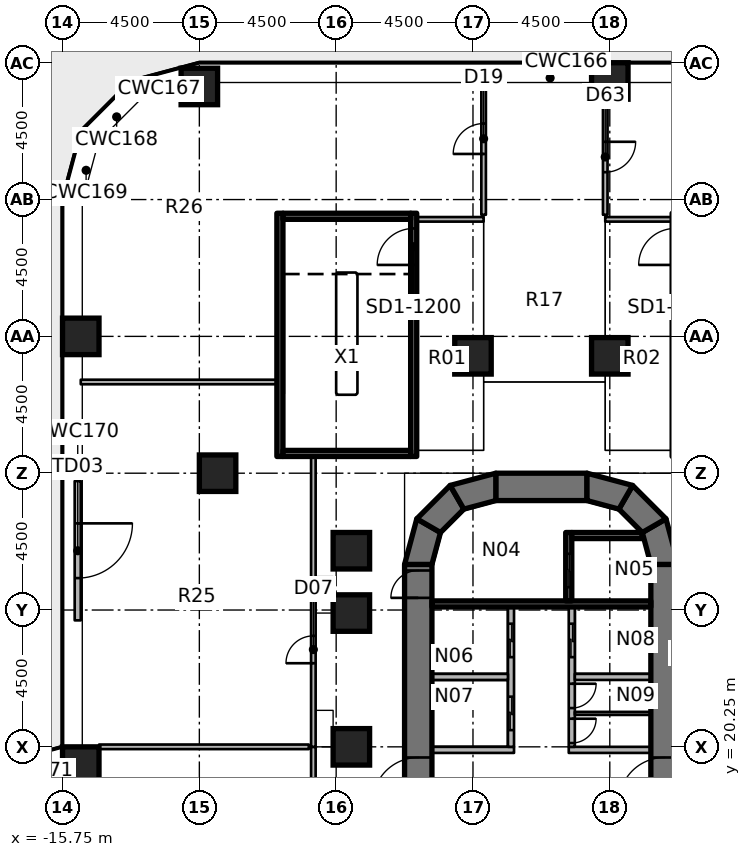
"""IFC4 building model, lengths in metres.
Left out: names, types, materials, properties, quantities, classifications, styles, units other than length and angle.
Written with IfcOpenShell. Run it as: python <this file> out.ifc"""

import sys

from ifc_helpers import new_model, si_unit, direction, frame, frame_2d, origin, origin_2d, place, context, subcontext, project, spatial, polyline, rectangle, outline, extrude, element, fill, save


model = new_model("IFC4")
c1 = context("Model", 3, precision=1e-05, world=origin(), true_north=direction((0.0, 1.0)))
c2 = subcontext(c1, "Body", "Model", "MODEL_VIEW")
j1 = project(units=[si_unit("LENGTHUNIT", "METRE"), si_unit("PLANEANGLEUNIT", "RADIAN")], contexts=[c1])
p1 = place(None, origin())
s1 = spatial("IfcSite", under=j1, at=p1, CompositionType="ELEMENT")
p2 = place(p1, origin())
s2 = spatial("IfcBuilding", under=s1, at=p2, CompositionType="ELEMENT")
p3 = place(p2, frame((0.0, 0.0, 17.0)))
s3 = spatial("IfcBuildingStorey", under=s2, at=p3, CompositionType="ELEMENT", Elevation=17.0)
for number, where, z_axis, x_axis in (
    (1, (-15.15, 19.65, 0.0), (0.0, 0.0, 1.0), (1.0, 0.0, 0.0)),
    (2, (-15.15, 33.75, 0.0), (0.0, 0.0, 1.0), (1.0, 0.0, 0.0)),
    (3, (-10.65, 29.25, 0.0), (0.0, 0.0, 1.0), (1.0, 0.0, 0.0)),
    (4, (-11.25, 41.97, 0.0), (0.0, 0.0, 1.0), (1.0, 0.0, 0.0)),
    (5, (-6.25, 20.25, 0.0), (0.0, 0.0, 1.0), (1.0, 0.0, 0.0)),
    (6, (-6.25, 24.65, 0.0), (0.0, 0.0, 1.0), (1.0, 0.0, 0.0)),
    (7, (-6.25, 26.7, 0.0), (0.0, 0.0, 1.0), (1.0, 0.0, 0.0)),
    (8, (-2.25, 33.11, 0.0), (0.0, 0.0, 1.0), (1.0, 0.0, 0.0)),
    (9, (2.25, 33.11, 0.0), (0.0, 0.0, 1.0), (1.0, 0.0, 0.0)),
    (10, (2.25, 42.15, 0.0), (0.0, 0.0, 1.0), (1.0, 0.0, 0.0)),
):
    element("IfcColumn", number, at=place(p3, frame(where, z_axis=z_axis, x_axis=x_axis)), inside=s3, PredefinedType="COLUMN", context=c2, shape_type="SweptSolid", body=[
        extrude(rectangle(XDim=1.2, YDim=1.2, at=origin_2d()), origin(), (0.0, 0.0, 1.0), 4.55),
    ])
p4 = place(p3, frame((-4.05, 11.25, 0.0), z_axis=(0.0, 0.0, 1.0), x_axis=(0.0, 1.0, 0.0)))
e11 = element("IfcWall", 11, at=p4, inside=s3, PredefinedType="SHEAR", context=c2, shape_type="SweptSolid", body=[
    extrude(rectangle(XDim=15.0, YDim=0.9, at=frame_2d((7.5, 0.0))), origin(), (0.0, 0.0, 1.0), 5.0),
])
p5 = place(p4, frame((7.15, 0.0, 0.0)))
e12 = element("IfcOpeningElement", 12, at=p5, cuts=e11, PredefinedType="OPENING", context=c2, shape_type="SweptSolid", body=[
    extrude(rectangle(XDim=1.5, YDim=2.3, at=frame_2d((0.75, 1.15))), frame((0.0, 0.46, 0.0), z_axis=(0.0, -1.0, 0.0), x_axis=(1.0, 0.0, 0.0)), (0.0, 0.0, 1.0), 0.92),
])
p6 = place(p4, frame((13.9, 0.0, 0.0)))
e13 = element("IfcOpeningElement", 13, at=p6, cuts=e11, PredefinedType="OPENING", context=c2, shape_type="SweptSolid", body=[
    extrude(rectangle(XDim=0.9, YDim=2.1, at=frame_2d((0.45, 1.05))), frame((0.0, 0.46, 0.0), z_axis=(0.0, -1.0, 0.0), x_axis=(1.0, 0.0, 0.0)), (0.0, 0.0, 1.0), 0.92),
])
p7 = place(p4, frame((1.15, 0.0, 0.0)))
e14 = element("IfcOpeningElement", 14, at=p7, cuts=e11, PredefinedType="OPENING", context=c2, shape_type="SweptSolid", body=[
    extrude(rectangle(XDim=1.2, YDim=2.1, at=frame_2d((0.6, 1.05))), frame((0.0, 0.46, 0.0), z_axis=(0.0, -1.0, 0.0), x_axis=(1.0, 0.0, 0.0)), (0.0, 0.0, 1.0), 0.92),
])
p8 = place(p3, frame((4.05, 11.25, 0.0), z_axis=(0.0, 0.0, 1.0), x_axis=(0.0, 1.0, 0.0)))
e15 = element("IfcWall", 15, at=p8, inside=s3, PredefinedType="SHEAR", context=c2, shape_type="SweptSolid", body=[
    extrude(rectangle(XDim=15.0, YDim=0.9, at=frame_2d((7.5, 0.0))), origin(), (0.0, 0.0, 1.0), 5.0),
])
p9 = place(p8, frame((7.15, 0.0, 0.0)))
e16 = element("IfcOpeningElement", 16, at=p9, cuts=e15, PredefinedType="OPENING", context=c2, shape_type="SweptSolid", body=[
    extrude(rectangle(XDim=1.5, YDim=2.3, at=frame_2d((0.75, 1.15))), frame((0.0, 0.46, 0.0), z_axis=(0.0, -1.0, 0.0), x_axis=(1.0, 0.0, 0.0)), (0.0, 0.0, 1.0), 0.92),
])
p10 = place(p8, frame((5.55, 0.0, 0.0)))
e17 = element("IfcOpeningElement", 17, at=p10, cuts=e15, PredefinedType="OPENING", context=c2, shape_type="SweptSolid", body=[
    extrude(rectangle(XDim=1.2, YDim=2.1, at=frame_2d((0.6, 1.05))), frame((0.0, 0.46, 0.0), z_axis=(0.0, -1.0, 0.0), x_axis=(1.0, 0.0, 0.0)), (0.0, 0.0, 1.0), 0.92),
])
p11 = place(p3, frame((-1.5, 28.8, 0.0), z_axis=(0.0, 0.0, 1.0), x_axis=(1.0, 0.0, 0.0)))
e18 = element("IfcWall", 18, at=p11, inside=s3, PredefinedType="SHEAR", context=c2, shape_type="SweptSolid", body=[
    extrude(rectangle(XDim=3.0, YDim=0.9, at=frame_2d((1.5, 0.0))), origin(), (0.0, 0.0, 1.0), 5.0),
])
p12 = place(p3, origin())
e19 = element("IfcWall", 19, at=p12, inside=s3, PredefinedType="SHEAR", context=c2, shape_type="SweptSolid", body=[
    extrude(outline(polyline([(-4.5, 26.25), (-4.098, 27.75), (-3.319, 27.3), (-3.6, 26.25), (-4.5, 26.25)])), origin(), (0.0, 0.0, 1.0), 5.0),
])
p13 = place(p3, origin())
e20 = element("IfcWall", 20, at=p13, inside=s3, PredefinedType="SHEAR", context=c2, shape_type="SweptSolid", body=[
    extrude(outline(polyline([(-4.098, 27.75), (-3.0, 28.848), (-2.55, 28.069), (-3.319, 27.3), (-4.098, 27.75)])), origin(), (0.0, 0.0, 1.0), 5.0),
])
p14 = place(p3, origin())
e21 = element("IfcWall", 21, at=p14, inside=s3, PredefinedType="SHEAR", context=c2, shape_type="SweptSolid", body=[
    extrude(outline(polyline([(-3.0, 28.848), (-1.5, 29.25), (-1.5, 28.35), (-2.55, 28.069), (-3.0, 28.848)])), origin(), (0.0, 0.0, 1.0), 5.0),
])
p15 = place(p3, origin())
e22 = element("IfcWall", 22, at=p15, inside=s3, PredefinedType="SHEAR", context=c2, shape_type="SweptSolid", body=[
    extrude(outline(polyline([(4.5, 26.25), (4.098, 27.75), (3.319, 27.3), (3.6, 26.25), (4.5, 26.25)])), origin(), (0.0, 0.0, 1.0), 5.0),
])
p16 = place(p3, origin())
e23 = element("IfcWall", 23, at=p16, inside=s3, PredefinedType="SHEAR", context=c2, shape_type="SweptSolid", body=[
    extrude(outline(polyline([(4.098, 27.75), (3.0, 28.848), (2.55, 28.069), (3.319, 27.3), (4.098, 27.75)])), origin(), (0.0, 0.0, 1.0), 5.0),
])
p17 = place(p3, origin())
e24 = element("IfcWall", 24, at=p17, inside=s3, PredefinedType="SHEAR", context=c2, shape_type="SweptSolid", body=[
    extrude(outline(polyline([(3.0, 28.848), (1.5, 29.25), (1.5, 28.35), (2.55, 28.069), (3.0, 28.848)])), origin(), (0.0, 0.0, 1.0), 5.0),
])
p18 = place(p3, frame((-15.25, 28.99, 0.0), z_axis=(0.0, 0.0, 1.0), x_axis=(0.0, -1.0, 0.0)))
e25 = element("IfcWall", 25, at=p18, inside=s3, PredefinedType="SOLIDWALL", context=c2, shape_type="SweptSolid", body=[
    extrude(rectangle(XDim=4.58, YDim=0.2, at=frame_2d((2.29, 0.0))), origin(), (0.0, 0.0, 1.0), 4.55),
])
p19 = place(p18, frame((1.39, 0.0, 0.0)))
e26 = element("IfcOpeningElement", 26, at=p19, cuts=e25, PredefinedType="OPENING", context=c2, shape_type="SweptSolid", body=[
    extrude(rectangle(XDim=1.8, YDim=2.4, at=frame_2d((0.9, 1.2))), frame((0.0, 0.11, 0.0), z_axis=(0.0, -1.0, 0.0), x_axis=(1.0, 0.0, 0.0)), (0.0, 0.0, 1.0), 0.22),
])
p20 = place(p3, frame((-3.6, 24.95, 0.0), z_axis=(0.0, 0.0, 1.0), x_axis=(1.0, 0.0, 0.0)))
e27 = element("IfcWall", 27, at=p20, inside=s3, PredefinedType="SHEAR", context=c2, shape_type="SweptSolid", body=[
    extrude(rectangle(XDim=7.2, YDim=0.2, at=frame_2d((3.6, 0.0))), origin(), (0.0, 0.0, 1.0), 4.55),
])
p21 = place(p3, frame((0.9, 27.3, 0.0), z_axis=(0.0, 0.0, 1.0), x_axis=(0.0, -1.0, 0.0)))
e28 = element("IfcWall", 28, at=p21, inside=s3, PredefinedType="SHEAR", context=c2, shape_type="SweptSolid", body=[
    extrude(rectangle(XDim=2.25, YDim=0.2, at=frame_2d((1.125, 0.0))), origin(), (0.0, 0.0, 1.0), 4.55),
])
p22 = place(p21, frame((0.7, 0.0, 0.0)))
e29 = element("IfcOpeningElement", 29, at=p22, cuts=e28, PredefinedType="OPENING", context=c2, shape_type="SweptSolid", body=[
    extrude(rectangle(XDim=1.1, YDim=2.3, at=frame_2d((0.55, 1.15))), frame((0.0, 0.11, 0.0), z_axis=(0.0, -1.0, 0.0), x_axis=(1.0, 0.0, 0.0)), (0.0, 0.0, 1.0), 0.22),
])
p23 = place(p3, origin())
e30 = element("IfcWall", 30, at=p23, inside=s3, PredefinedType="SHEAR", context=c2, shape_type="SweptSolid", body=[
    extrude(outline(polyline([(1.0, 27.1), (3.341, 27.1), (3.291, 27.284), (3.275, 27.3), (1.0, 27.3), (1.0, 27.1)])), origin(), (0.0, 0.0, 1.0), 4.55),
])
p24 = place(p3, frame((-3.6, 20.15, 0.0), z_axis=(0.0, 0.0, 1.0), x_axis=(1.0, 0.0, 0.0)))
e31 = element("IfcWall", 31, at=p24, inside=s3, PredefinedType="PARTITIONING", context=c2, shape_type="SweptSolid", body=[
    extrude(rectangle(XDim=2.7, YDim=0.2, at=frame_2d((1.35, 0.0))), origin(), (0.0, 0.0, 1.0), 4.55),
])
p25 = place(p3, frame((-1.0, 24.85, 0.0), z_axis=(0.0, 0.0, 1.0), x_axis=(0.0, -1.0, 0.0)))
e32 = element("IfcWall", 32, at=p25, inside=s3, PredefinedType="PARTITIONING", context=c2, shape_type="SweptSolid", body=[
    extrude(rectangle(XDim=4.6, YDim=0.2, at=frame_2d((2.3, 0.0))), origin(), (0.0, 0.0, 1.0), 4.55),
])
p26 = place(p25, frame((0.55, 0.0, 0.0)))
e33 = element("IfcOpeningElement", 33, at=p26, cuts=e32, PredefinedType="OPENING", context=c2, shape_type="SweptSolid", body=[
    extrude(rectangle(XDim=1.1, YDim=2.3, at=frame_2d((0.55, 1.15))), frame((0.0, 0.11, 0.0), z_axis=(0.0, -1.0, 0.0), x_axis=(1.0, 0.0, 0.0)), (0.0, 0.0, 1.0), 0.22),
])
p27 = place(p25, frame((2.95, 0.0, 0.0)))
e34 = element("IfcOpeningElement", 34, at=p27, cuts=e32, PredefinedType="OPENING", context=c2, shape_type="SweptSolid", body=[
    extrude(rectangle(XDim=1.1, YDim=2.3, at=frame_2d((0.55, 1.15))), frame((0.0, 0.11, 0.0), z_axis=(0.0, -1.0, 0.0), x_axis=(1.0, 0.0, 0.0)), (0.0, 0.0, 1.0), 0.22),
])
p28 = place(p3, frame((0.9, 20.15, 0.0), z_axis=(0.0, 0.0, 1.0), x_axis=(1.0, 0.0, 0.0)))
e35 = element("IfcWall", 35, at=p28, inside=s3, PredefinedType="PARTITIONING", context=c2, shape_type="SweptSolid", body=[
    extrude(rectangle(XDim=2.7, YDim=0.2, at=frame_2d((1.35, 0.0))), origin(), (0.0, 0.0, 1.0), 4.55),
])
p29 = place(p3, frame((1.0, 24.85, 0.0), z_axis=(0.0, 0.0, 1.0), x_axis=(0.0, -1.0, 0.0)))
e36 = element("IfcWall", 36, at=p29, inside=s3, PredefinedType="PARTITIONING", context=c2, shape_type="SweptSolid", body=[
    extrude(rectangle(XDim=4.6, YDim=0.2, at=frame_2d((2.3, 0.0))), origin(), (0.0, 0.0, 1.0), 4.55),
])
p30 = place(p29, frame((0.55, 0.0, 0.0)))
e37 = element("IfcOpeningElement", 37, at=p30, cuts=e36, PredefinedType="OPENING", context=c2, shape_type="SweptSolid", body=[
    extrude(rectangle(XDim=1.1, YDim=2.3, at=frame_2d((0.55, 1.15))), frame((0.0, 0.11, 0.0), z_axis=(0.0, -1.0, 0.0), x_axis=(1.0, 0.0, 0.0)), (0.0, 0.0, 1.0), 0.22),
])
p31 = place(p29, frame((2.525, 0.0, 0.0)))
e38 = element("IfcOpeningElement", 38, at=p31, cuts=e36, PredefinedType="OPENING", context=c2, shape_type="SweptSolid", body=[
    extrude(rectangle(XDim=0.8, YDim=2.1, at=frame_2d((0.4, 1.05))), frame((0.0, 0.11, 0.0), z_axis=(0.0, -1.0, 0.0), x_axis=(1.0, 0.0, 0.0)), (0.0, 0.0, 1.0), 0.22),
])
p32 = place(p29, frame((3.675, 0.0, 0.0)))
e39 = element("IfcOpeningElement", 39, at=p32, cuts=e36, PredefinedType="OPENING", context=c2, shape_type="SweptSolid", body=[
    extrude(rectangle(XDim=0.8, YDim=2.1, at=frame_2d((0.4, 1.05))), frame((0.0, 0.11, 0.0), z_axis=(0.0, -1.0, 0.0), x_axis=(1.0, 0.0, 0.0)), (0.0, 0.0, 1.0), 0.22),
])
for number, where, z_axis, x_axis in (
    (40, (-3.6, 22.55, 0.0), (0.0, 0.0, 1.0), (1.0, 0.0, 0.0)),
    (41, (1.1, 22.55, 0.0), (0.0, 0.0, 1.0), (1.0, 0.0, 0.0)),
):
    element("IfcWall", number, at=place(p3, frame(where, z_axis=z_axis, x_axis=x_axis)), inside=s3, PredefinedType="PARTITIONING", context=c2, shape_type="SweptSolid", body=[
        extrude(rectangle(XDim=2.5, YDim=0.2, at=frame_2d((1.25, 0.0))), origin(), (0.0, 0.0, 1.0), 4.55),
    ])
p33 = place(p3, frame((1.1, 21.35, 0.0), z_axis=(0.0, 0.0, 1.0), x_axis=(1.0, 0.0, 0.0)))
e42 = element("IfcWall", 42, at=p33, inside=s3, PredefinedType="PARTITIONING", context=c2, shape_type="SweptSolid", body=[
    extrude(rectangle(XDim=2.5, YDim=0.1, at=frame_2d((1.25, 0.0))), origin(), (0.0, 0.0, 1.0), 4.55),
])
p34 = place(p3, frame((-8.6, 29.8, 0.0), z_axis=(0.0, 0.0, 1.0), x_axis=(0.0, 1.0, 0.0)))
e43 = element("IfcWall", 43, at=p34, inside=s3, PredefinedType="SHEAR", context=c2, shape_type="SweptSolid", body=[
    extrude(rectangle(XDim=8.0, YDim=0.2, at=frame_2d((4.0, 0.0))), origin(), (0.0, 0.0, 1.0), 4.55),
])
p35 = place(p3, frame((-4.2, 29.8, 0.0), z_axis=(0.0, 0.0, 1.0), x_axis=(0.0, 1.0, 0.0)))
e44 = element("IfcWall", 44, at=p35, inside=s3, PredefinedType="SHEAR", context=c2, shape_type="SweptSolid", body=[
    extrude(rectangle(XDim=8.0, YDim=0.2, at=frame_2d((4.0, 0.0))), origin(), (0.0, 0.0, 1.0), 4.55),
])
p36 = place(p35, frame((6.3, 0.0, 0.0)))
e45 = element("IfcOpeningElement", 45, at=p36, cuts=e44, PredefinedType="OPENING", context=c2, shape_type="SweptSolid", body=[
    extrude(rectangle(XDim=1.2, YDim=2.1, at=frame_2d((0.6, 1.05))), frame((0.0, 0.11, 0.0), z_axis=(0.0, -1.0, 0.0), x_axis=(1.0, 0.0, 0.0)), (0.0, 0.0, 1.0), 0.22),
])
for number, where, z_axis, x_axis in (
    (46, (-8.5, 29.9, 0.0), (0.0, 0.0, 1.0), (1.0, 0.0, 0.0)),
    (47, (-8.5, 37.7, 0.0), (0.0, 0.0, 1.0), (1.0, 0.0, 0.0)),
):
    element("IfcWall", number, at=place(p3, frame(where, z_axis=z_axis, x_axis=x_axis)), inside=s3, PredefinedType="SHEAR", context=c2, shape_type="SweptSolid", body=[
        extrude(rectangle(XDim=4.2, YDim=0.2, at=frame_2d((2.1, 0.0))), origin(), (0.0, 0.0, 1.0), 4.55),
    ])
p37 = place(p3, frame((-4.1, 37.6, 0.0), z_axis=(0.0, 0.0, 1.0), x_axis=(1.0, 0.0, 0.0)))
e48 = element("IfcWall", 48, at=p37, inside=s3, PredefinedType="PARTITIONING", context=c2, shape_type="SweptSolid", body=[
    extrude(rectangle(XDim=2.2, YDim=0.15, at=frame_2d((1.1, 0.0))), origin(), (0.0, 0.0, 1.0), 4.55),
])
p38 = place(p3, frame((2.1, 37.6, 0.0), z_axis=(0.0, 0.0, 1.0), x_axis=(1.0, 0.0, 0.0)))
e49 = element("IfcWall", 49, at=p38, inside=s3, PredefinedType="PARTITIONING", context=c2, shape_type="SweptSolid", body=[
    extrude(rectangle(XDim=2.2, YDim=0.15, at=frame_2d((1.1, 0.0))), origin(), (0.0, 0.0, 1.0), 4.55),
])
p39 = place(p3, frame((-7.5, 8.25, 0.0), z_axis=(0.0, 0.0, 1.0), x_axis=(0.0, 1.0, 0.0)))
e50 = element("IfcWall", 50, at=p39, inside=s3, PredefinedType="PARTITIONING", context=c2, shape_type="SweptSolid", body=[
    extrude(rectangle(XDim=12.0, YDim=0.15, at=frame_2d((6.0, 0.0))), origin(), (0.0, 0.0, 1.0), 4.55),
])
p40 = place(p39, frame((3.5, 0.0, 0.0)))
e51 = element("IfcOpeningElement", 51, at=p40, cuts=e50, PredefinedType="OPENING", context=c2, shape_type="SweptSolid", body=[
    extrude(rectangle(XDim=1.0, YDim=2.1, at=frame_2d((0.5, 1.05))), frame((0.0, 0.085, 0.0), z_axis=(0.0, -1.0, 0.0), x_axis=(1.0, 0.0, 0.0)), (0.0, 0.0, 1.0), 0.17),
])
p41 = place(p3, frame((-7.5, 20.25, 0.0), z_axis=(0.0, 0.0, 1.0), x_axis=(0.0, 1.0, 0.0)))
e52 = element("IfcWall", 52, at=p41, inside=s3, PredefinedType="PARTITIONING", context=c2, shape_type="SweptSolid", body=[
    extrude(rectangle(XDim=9.75, YDim=0.15, at=frame_2d((4.875, 0.0))), origin(), (0.0, 0.0, 1.0), 4.55),
])
p42 = place(p41, frame((2.75, 0.0, 0.0)))
e53 = element("IfcOpeningElement", 53, at=p42, cuts=e52, PredefinedType="OPENING", context=c2, shape_type="SweptSolid", body=[
    extrude(rectangle(XDim=0.9, YDim=2.1, at=frame_2d((0.45, 1.05))), frame((0.0, 0.085, 0.0), z_axis=(0.0, -1.0, 0.0), x_axis=(1.0, 0.0, 0.0)), (0.0, 0.0, 1.0), 0.17),
])
p43 = place(p3, frame((2.1, 41.55, 0.0), z_axis=(0.0, 0.0, 1.0), x_axis=(0.0, -1.0, 0.0)))
e54 = element("IfcWall", 54, at=p43, inside=s3, PredefinedType="PARTITIONING", context=c2, shape_type="SweptSolid", body=[
    extrude(rectangle(XDim=3.8, YDim=0.15, at=frame_2d((1.9, 0.0))), origin(), (0.0, 0.0, 1.0), 4.55),
])
p44 = place(p43, frame((1.4, 0.0, 0.0)))
e55 = element("IfcOpeningElement", 55, at=p44, cuts=e54, PredefinedType="OPENING", context=c2, shape_type="SweptSolid", body=[
    extrude(rectangle(XDim=1.0, YDim=2.1, at=frame_2d((0.5, 1.05))), frame((0.0, 0.085, 0.0), z_axis=(0.0, -1.0, 0.0), x_axis=(1.0, 0.0, 0.0)), (0.0, 0.0, 1.0), 0.17),
])
p45 = place(p3, frame((-1.9, 37.75, 0.0), z_axis=(0.0, 0.0, 1.0), x_axis=(0.0, 1.0, 0.0)))
e56 = element("IfcWall", 56, at=p45, inside=s3, PredefinedType="PARTITIONING", context=c2, shape_type="SweptSolid", body=[
    extrude(rectangle(XDim=4.4, YDim=0.15, at=frame_2d((2.2, 0.0))), origin(), (0.0, 0.0, 1.0), 4.55),
])
p46 = place(p45, frame((2.0, 0.0, 0.0)))
e57 = element("IfcOpeningElement", 57, at=p46, cuts=e56, PredefinedType="OPENING", context=c2, shape_type="SweptSolid", body=[
    extrude(rectangle(XDim=1.0, YDim=2.1, at=frame_2d((0.5, 1.05))), frame((0.0, 0.085, 0.0), z_axis=(0.0, -1.0, 0.0), x_axis=(1.0, 0.0, 0.0)), (0.0, 0.0, 1.0), 0.17),
])
p47 = place(p3, frame((-14.55, 20.25, 0.0), z_axis=(0.0, 0.0, 1.0), x_axis=(1.0, 0.0, 0.0)))
e58 = element("IfcWall", 58, at=p47, inside=s3, PredefinedType="PARTITIONING", context=c2, shape_type="SweptSolid", body=[
    extrude(rectangle(XDim=6.9, YDim=0.15, at=frame_2d((3.45, 0.0))), origin(), (0.0, 0.0, 1.0), 4.55),
])
p48 = place(p3, frame((-15.15, 32.25, 0.0), z_axis=(0.0, 0.0, 1.0), x_axis=(1.0, 0.0, 0.0)))
e59 = element("IfcWall", 59, at=p48, inside=s3, PredefinedType="PARTITIONING", context=c2, shape_type="SweptSolid", body=[
    extrude(rectangle(XDim=6.45, YDim=0.15, at=frame_2d((3.225, 0.0))), origin(), (0.0, 0.0, 1.0), 4.55),
])
p49 = place(p19, origin())
e60 = element("IfcDoor", 60, at=p49, inside=s3, OperationType="SINGLE_SWING_LEFT", PredefinedType="DOOR", context=c2, shape_type="SweptSolid", body=[
    extrude(rectangle(XDim=1.8, YDim=2.4, at=frame_2d((0.9, 1.2))), frame((0.0, 0.025, 0.0), z_axis=(0.0, -1.0, 0.0), x_axis=(1.0, 0.0, 0.0)), (0.0, 0.0, 1.0), 0.05),
])
fill(e26, e60)
p50 = place(p5, origin())
e61 = element("IfcDoor", 61, at=p50, inside=s3, OperationType="DOUBLE_DOOR_SINGLE_SWING", PredefinedType="DOOR", context=c2, shape_type="SweptSolid", body=[
    extrude(rectangle(XDim=1.5, YDim=2.3, at=frame_2d((0.75, 1.15))), frame((0.0, 0.025, 0.0), z_axis=(0.0, -1.0, 0.0), x_axis=(1.0, 0.0, 0.0)), (0.0, 0.0, 1.0), 0.05),
])
fill(e12, e61)
p51 = place(p9, origin())
e62 = element("IfcDoor", 62, at=p51, inside=s3, OperationType="DOUBLE_DOOR_SINGLE_SWING", PredefinedType="DOOR", context=c2, shape_type="SweptSolid", body=[
    extrude(rectangle(XDim=1.5, YDim=2.3, at=frame_2d((0.75, 1.15))), frame((0.0, 0.025, 0.0), z_axis=(0.0, -1.0, 0.0), x_axis=(1.0, 0.0, 0.0)), (0.0, 0.0, 1.0), 0.05),
])
fill(e16, e62)
p52 = place(p6, origin())
e63 = element("IfcDoor", 63, at=p52, inside=s3, OperationType="SINGLE_SWING_LEFT", PredefinedType="DOOR", context=c2, shape_type="SweptSolid", body=[
    extrude(rectangle(XDim=0.9, YDim=2.1, at=frame_2d((0.45, 1.05))), frame((0.0, 0.025, 0.0), z_axis=(0.0, -1.0, 0.0), x_axis=(1.0, 0.0, 0.0)), (0.0, 0.0, 1.0), 0.05),
])
fill(e13, e63)
p53 = place(p22, origin())
e64 = element("IfcDoor", 64, at=p53, inside=s3, OperationType="DOUBLE_DOOR_SLIDING", PredefinedType="DOOR", context=c2, shape_type="SweptSolid", body=[
    extrude(rectangle(XDim=1.1, YDim=2.3, at=frame_2d((0.55, 1.15))), frame((0.0, 0.025, 0.0), z_axis=(0.0, -1.0, 0.0), x_axis=(1.0, 0.0, 0.0)), (0.0, 0.0, 1.0), 0.05),
])
fill(e29, e64)
p54 = place(p26, origin())
e65 = element("IfcDoor", 65, at=p54, inside=s3, OperationType="DOUBLE_DOOR_SLIDING", PredefinedType="DOOR", context=c2, shape_type="SweptSolid", body=[
    extrude(rectangle(XDim=1.1, YDim=2.3, at=frame_2d((0.55, 1.15))), frame((0.0, 0.025, 0.0), z_axis=(0.0, -1.0, 0.0), x_axis=(1.0, 0.0, 0.0)), (0.0, 0.0, 1.0), 0.05),
])
fill(e33, e65)
p55 = place(p27, origin())
e66 = element("IfcDoor", 66, at=p55, inside=s3, OperationType="DOUBLE_DOOR_SLIDING", PredefinedType="DOOR", context=c2, shape_type="SweptSolid", body=[
    extrude(rectangle(XDim=1.1, YDim=2.3, at=frame_2d((0.55, 1.15))), frame((0.0, 0.025, 0.0), z_axis=(0.0, -1.0, 0.0), x_axis=(1.0, 0.0, 0.0)), (0.0, 0.0, 1.0), 0.05),
])
fill(e34, e66)
p56 = place(p30, origin())
e67 = element("IfcDoor", 67, at=p56, inside=s3, OperationType="DOUBLE_DOOR_SLIDING", PredefinedType="DOOR", context=c2, shape_type="SweptSolid", body=[
    extrude(rectangle(XDim=1.1, YDim=2.3, at=frame_2d((0.55, 1.15))), frame((0.0, 0.025, 0.0), z_axis=(0.0, -1.0, 0.0), x_axis=(1.0, 0.0, 0.0)), (0.0, 0.0, 1.0), 0.05),
])
fill(e37, e67)
p57 = place(p31, origin())
e68 = element("IfcDoor", 68, at=p57, inside=s3, OperationType="SINGLE_SWING_RIGHT", PredefinedType="DOOR", context=c2, shape_type="SweptSolid", body=[
    extrude(rectangle(XDim=0.8, YDim=2.1, at=frame_2d((0.4, 1.05))), frame((0.0, 0.025, 0.0), z_axis=(0.0, -1.0, 0.0), x_axis=(1.0, 0.0, 0.0)), (0.0, 0.0, 1.0), 0.05),
])
fill(e38, e68)
p58 = place(p32, origin())
e69 = element("IfcDoor", 69, at=p58, inside=s3, OperationType="SINGLE_SWING_RIGHT", PredefinedType="DOOR", context=c2, shape_type="SweptSolid", body=[
    extrude(rectangle(XDim=0.8, YDim=2.1, at=frame_2d((0.4, 1.05))), frame((0.0, 0.025, 0.0), z_axis=(0.0, -1.0, 0.0), x_axis=(1.0, 0.0, 0.0)), (0.0, 0.0, 1.0), 0.05),
])
fill(e39, e69)
p59 = place(p36, origin())
e70 = element("IfcDoor", 70, at=p59, inside=s3, OperationType="SINGLE_SWING_RIGHT", PredefinedType="DOOR", context=c2, shape_type="SweptSolid", body=[
    extrude(rectangle(XDim=1.2, YDim=2.1, at=frame_2d((0.6, 1.05))), frame((0.0, 0.025, 0.0), z_axis=(0.0, -1.0, 0.0), x_axis=(1.0, 0.0, 0.0)), (0.0, 0.0, 1.0), 0.05),
])
fill(e45, e70)
p60 = place(p42, origin())
e71 = element("IfcDoor", 71, at=p60, inside=s3, OperationType="SINGLE_SWING_LEFT", PredefinedType="DOOR", context=c2, shape_type="SweptSolid", body=[
    extrude(rectangle(XDim=0.9, YDim=2.1, at=frame_2d((0.45, 1.05))), frame((0.0, 0.025, 0.0), z_axis=(0.0, -1.0, 0.0), x_axis=(1.0, 0.0, 0.0)), (0.0, 0.0, 1.0), 0.05),
])
fill(e53, e71)
p61 = place(p44, origin())
e72 = element("IfcDoor", 72, at=p61, inside=s3, OperationType="SINGLE_SWING_LEFT", PredefinedType="DOOR", context=c2, shape_type="SweptSolid", body=[
    extrude(rectangle(XDim=1.0, YDim=2.1, at=frame_2d((0.5, 1.05))), frame((0.0, 0.025, 0.0), z_axis=(0.0, -1.0, 0.0), x_axis=(1.0, 0.0, 0.0)), (0.0, 0.0, 1.0), 0.05),
])
fill(e55, e72)
p62 = place(p46, origin())
e73 = element("IfcDoor", 73, at=p62, inside=s3, OperationType="SINGLE_SWING_LEFT", PredefinedType="DOOR", context=c2, shape_type="SweptSolid", body=[
    extrude(rectangle(XDim=1.0, YDim=2.1, at=frame_2d((0.5, 1.05))), frame((0.0, 0.025, 0.0), z_axis=(0.0, -1.0, 0.0), x_axis=(1.0, 0.0, 0.0)), (0.0, 0.0, 1.0), 0.05),
])
fill(e57, e73)
save(model, sys.argv[1])
